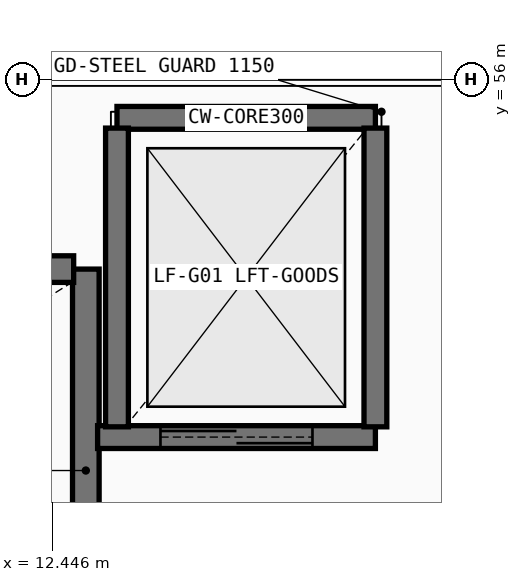
"""IFC4 building model, lengths in metres.
Left out: names, types, materials, properties, quantities, classifications, styles, units other than length and angle.
Written with IfcOpenShell. Run it as: python <this file> out.ifc"""

import sys

from ifc_helpers import new_model, si_unit, direction, frame, frame_2d, origin, place, context, subcontext, project, spatial, rectangle, extrude, element, fill, save


model = new_model("IFC4")
c1 = context("Model", 3, precision=1e-05, world=origin(), true_north=direction((0.0, 1.0)))
c2 = subcontext(c1, "Body", "Model", "MODEL_VIEW")
j1 = project(units=[si_unit("LENGTHUNIT", "METRE"), si_unit("PLANEANGLEUNIT", "RADIAN")], contexts=[c1])
p1 = place(None, origin())
s1 = spatial("IfcSite", under=j1, at=p1, CompositionType="ELEMENT")
p2 = place(p1, origin())
s2 = spatial("IfcBuilding", under=s1, at=p2, CompositionType="ELEMENT")
p3 = place(p2, frame((0.0, 0.0, 15.9)))
s3 = spatial("IfcBuildingStorey", under=s2, at=p3, CompositionType="ELEMENT", Elevation=15.9)
p4 = place(p3, frame((12.89, 48.21, 0.0), z_axis=(0.0, 0.0, 1.0), x_axis=(0.0, 1.0, 0.0)))
e1 = element("IfcWall", 1, at=p4, inside=s3, PredefinedType="SHEAR", context=c2, shape_type="SweptSolid", body=[
    extrude(rectangle(XDim=5.3, YDim=0.35, at=frame_2d((2.65, 0.0))), origin(), (0.0, 0.0, 1.0), 3.835),
])
p5 = place(p3, frame((12.73, 53.51, 0.0), z_axis=(0.0, 0.0, 1.0), x_axis=(-1.0, 0.0, 0.0)))
e2 = element("IfcWall", 2, at=p5, inside=s3, PredefinedType="SHEAR", context=c2, shape_type="SweptSolid", body=[
    extrude(rectangle(XDim=10.88, YDim=0.35, at=frame_2d((5.44, 0.0))), origin(), (0.0, 0.0, 1.0), 3.835),
])
p6 = place(p3, frame((16.7, 55.5, 0.0), z_axis=(0.0, 0.0, 1.0), x_axis=(-1.0, 0.0, 0.0)))
e3 = element("IfcWall", 3, at=p6, inside=s3, PredefinedType="SHEAR", context=c2, shape_type="SweptSolid", body=[
    extrude(rectangle(XDim=3.4, YDim=0.3, at=frame_2d((1.7, 0.0))), origin(), (0.0, 0.0, 1.0), 3.835),
])
p7 = place(p3, frame((13.045, 51.3, 0.0), z_axis=(0.0, 0.0, 1.0), x_axis=(1.0, 0.0, 0.0)))
e4 = element("IfcWall", 4, at=p7, inside=s3, PredefinedType="SHEAR", context=c2, shape_type="SweptSolid", body=[
    extrude(rectangle(XDim=3.655, YDim=0.3, at=frame_2d((1.828, 0.0))), origin(), (0.0, 0.0, 1.0), 3.835),
])
p8 = place(p7, frame((0.827, 0.0, 0.0)))
e5 = element("IfcOpeningElement", 5, at=p8, cuts=e4, PredefinedType="OPENING", context=c2, shape_type="SweptSolid", body=[
    extrude(rectangle(XDim=2.0, YDim=2.5, at=frame_2d((1.0, 1.25))), frame((0.0, 0.16, 0.0), z_axis=(0.0, -1.0, 0.0), x_axis=(1.0, 0.0, 0.0)), (0.0, 0.0, 1.0), 0.32),
])
for number, where, z_axis, x_axis in (
    (6, (16.7, 51.435, 0.0), (0.0, 0.0, 1.0), (0.0, 1.0, 0.0)),
    (7, (13.3, 55.365, 0.0), (0.0, 0.0, 1.0), (0.0, -1.0, 0.0)),
):
    element("IfcWall", number, at=place(p3, frame(where, z_axis=z_axis, x_axis=x_axis)), inside=s3, PredefinedType="SHEAR", context=c2, shape_type="SweptSolid", body=[
        extrude(rectangle(XDim=3.93, YDim=0.3, at=frame_2d((1.965, 0.0))), origin(), (0.0, 0.0, 1.0), 3.835),
    ])
p9 = place(p8, origin())
e8 = element("IfcDoor", 8, at=p9, inside=s3, OperationType="DOUBLE_DOOR_SLIDING", PredefinedType="DOOR", context=c2, shape_type="SweptSolid", body=[
    extrude(rectangle(XDim=2.0, YDim=2.5, at=frame_2d((1.0, 1.25))), frame((0.0, 0.025, 0.0), z_axis=(0.0, -1.0, 0.0), x_axis=(1.0, 0.0, 0.0)), (0.0, 0.0, 1.0), 0.05),
])
fill(e5, e8)
save(model, sys.argv[1])
